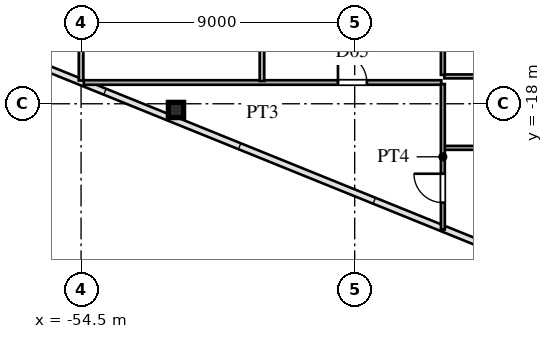
"""IFC4 building model, lengths in metres.
Left out: names, types, materials, properties, quantities, classifications, styles, units other than length and angle.
Written with IfcOpenShell. Run it as: python <this file> out.ifc"""

import sys

from ifc_helpers import new_model, si_unit, direction, frame, frame_2d, origin, origin_2d, place, context, subcontext, project, spatial, rectangle, hollow_rectangle, extrude, source, transform, mapped, element, fill, save


model = new_model("IFC4")
c1 = context("Model", 3, precision=1e-05, world=origin(), true_north=direction((0.0, 1.0)))
c2 = subcontext(c1, "Body", "Model", "MODEL_VIEW")
j1 = project(units=[si_unit("LENGTHUNIT", "METRE"), si_unit("PLANEANGLEUNIT", "RADIAN")], contexts=[c1])
p1 = place(None, origin())
s1 = spatial("IfcSite", under=j1, at=p1, CompositionType="ELEMENT")
p2 = place(p1, origin())
s2 = spatial("IfcBuilding", under=s1, at=p2, CompositionType="ELEMENT")
p3 = place(p2, frame((0.0, 0.0, 58.5)))
s3 = spatial("IfcBuildingStorey", under=s2, at=p3, CompositionType="ELEMENT", Elevation=58.5)
m1 = source(origin(), c2, "Body", "SweptSolid", [
    extrude(hollow_rectangle(XDim=0.5, YDim=0.5, WallThickness=0.02, at=origin_2d()), origin(), (0.0, 0.0, 1.0), 3.6),
])
p4 = place(p3, frame((-51.378, -18.204, 0.0), z_axis=(0.0, 0.0, 1.0), x_axis=(1.0, 0.0, 0.0)))
e1 = element("IfcColumn", 1, at=p4, inside=s3, PredefinedType="COLUMN", context=c2, shape_type="MappedRepresentation", body=[
    mapped(m1, transform((0.0, 0.0, 0.0), scale=1.0)),
])
p5 = place(p3, frame((-42.55, -19.45, 0.0), z_axis=(0.0, 0.0, 1.0), x_axis=(1.0, 0.0, 0.0)))
e2 = element("IfcWall", 2, at=p5, inside=s3, PredefinedType="PARTITIONING", context=c2, shape_type="SweptSolid", body=[
    extrude(rectangle(XDim=6.0, YDim=0.13, at=frame_2d((3.0, 0.0))), origin(), (0.0, 0.0, 1.0), 3.38),
])
p6 = place(p3, frame((-54.412, -17.3, 0.0), z_axis=(0.0, 0.0, 1.0), x_axis=(1.0, 0.0, 0.0)))
e3 = element("IfcWall", 3, at=p6, inside=s3, PredefinedType="PARTITIONING", context=c2, shape_type="SweptSolid", body=[
    extrude(rectangle(XDim=11.762, YDim=0.15, at=frame_2d((5.881, 0.0))), origin(), (0.0, 0.0, 1.0), 3.38),
])
p7 = place(p6, frame((8.362, 0.0, 0.0)))
e4 = element("IfcOpeningElement", 4, at=p7, cuts=e3, PredefinedType="OPENING", context=c2, shape_type="SweptSolid", body=[
    extrude(rectangle(XDim=0.95, YDim=2.15, at=frame_2d((0.475, 1.075))), frame((0.0, 0.085, 0.0), z_axis=(0.0, -1.0, 0.0), x_axis=(1.0, 0.0, 0.0)), (0.0, 0.0, 1.0), 0.17),
])
p8 = place(p3, frame((-42.55, -17.1, 0.0), z_axis=(0.0, 0.0, 1.0), x_axis=(1.0, 0.0, 0.0)))
e5 = element("IfcWall", 5, at=p8, inside=s3, PredefinedType="PARTITIONING", context=c2, shape_type="SweptSolid", body=[
    extrude(rectangle(XDim=5.25, YDim=0.13, at=frame_2d((2.625, 0.0))), origin(), (0.0, 0.0, 1.0), 3.38),
])
p9 = place(p8, frame((2.185, 0.0, 0.0)))
e6 = element("IfcOpeningElement", 6, at=p9, cuts=e5, PredefinedType="OPENING", context=c2, shape_type="SweptSolid", body=[
    extrude(rectangle(XDim=0.88, YDim=2.1, at=frame_2d((0.44, 1.05))), frame((0.0, 0.075, 0.0), z_axis=(0.0, -1.0, 0.0), x_axis=(1.0, 0.0, 0.0)), (0.0, 0.0, 1.0), 0.15),
])
p10 = place(p3, frame((-54.5, -17.236, 0.0), z_axis=(0.0, 0.0, 1.0), x_axis=(0.0, 1.0, 0.0)))
e7 = element("IfcWall", 7, at=p10, inside=s3, PredefinedType="PARTITIONING", context=c2, shape_type="SweptSolid", body=[
    extrude(rectangle(XDim=29.686, YDim=0.15, at=frame_2d((14.843, 0.0))), origin(), (0.0, 0.0, 1.0), 2.68),
])
p11 = place(p10, frame((1.868, 0.0, 0.0)))
e8 = element("IfcOpeningElement", 8, at=p11, cuts=e7, PredefinedType="OPENING", context=c2, shape_type="SweptSolid", body=[
    extrude(rectangle(XDim=0.95, YDim=2.15, at=frame_2d((0.475, 1.075))), frame((0.0, 0.085, 0.0), z_axis=(0.0, -1.0, 0.0), x_axis=(1.0, 0.0, 0.0)), (0.0, 0.0, 1.0), 0.17),
])
p12 = place(p10, frame((11.188, 0.0, 0.0)))
e9 = element("IfcOpeningElement", 9, at=p12, cuts=e7, PredefinedType="OPENING", context=c2, shape_type="SweptSolid", body=[
    extrude(rectangle(XDim=0.95, YDim=2.15, at=frame_2d((0.475, 1.075))), frame((0.0, 0.085, 0.0), z_axis=(0.0, -1.0, 0.0), x_axis=(1.0, 0.0, 0.0)), (0.0, 0.0, 1.0), 0.17),
])
p13 = place(p10, frame((23.761, 0.0, 0.0)))
e10 = element("IfcOpeningElement", 10, at=p13, cuts=e7, PredefinedType="OPENING", context=c2, shape_type="SweptSolid", body=[
    extrude(rectangle(XDim=0.95, YDim=2.15, at=frame_2d((0.475, 1.075))), frame((0.0, 0.085, 0.0), z_axis=(0.0, -1.0, 0.0), x_axis=(1.0, 0.0, 0.0)), (0.0, 0.0, 1.0), 0.17),
])
p14 = place(p3, frame((-48.55, -17.251, 0.0), z_axis=(0.0, 0.0, 1.0), x_axis=(0.0, 1.0, 0.0)))
e11 = element("IfcWall", 11, at=p14, inside=s3, PredefinedType="PARTITIONING", context=c2, shape_type="SweptSolid", body=[
    extrude(rectangle(XDim=4.701, YDim=0.15, at=frame_2d((2.351, 0.0))), origin(), (0.0, 0.0, 1.0), 3.38),
])
p15 = place(p14, frame((2.696, 0.0, 0.0)))
e12 = element("IfcOpeningElement", 12, at=p15, cuts=e11, PredefinedType="OPENING", context=c2, shape_type="SweptSolid", body=[
    extrude(rectangle(XDim=0.95, YDim=2.15, at=frame_2d((0.475, 1.075))), frame((0.0, 0.085, 0.0), z_axis=(0.0, -1.0, 0.0), x_axis=(1.0, 0.0, 0.0)), (0.0, 0.0, 1.0), 0.17),
])
p16 = place(p3, frame((-42.6, -22.137, 0.0), z_axis=(0.0, 0.0, 1.0), x_axis=(0.0, 1.0, 0.0)))
e13 = element("IfcWall", 13, at=p16, inside=s3, PredefinedType="PARTITIONING", context=c2, shape_type="SweptSolid", body=[
    extrude(rectangle(XDim=4.786, YDim=0.13, at=frame_2d((2.393, 0.0))), origin(), (0.0, 0.0, 1.0), 3.38),
])
p17 = place(p16, frame((0.886, 0.0, 0.0)))
e14 = element("IfcOpeningElement", 14, at=p17, cuts=e13, PredefinedType="OPENING", context=c2, shape_type="SweptSolid", body=[
    extrude(rectangle(XDim=0.95, YDim=2.15, at=frame_2d((0.475, 1.075))), frame((0.0, 0.075, 0.0), z_axis=(0.0, -1.0, 0.0), x_axis=(1.0, 0.0, 0.0)), (0.0, 0.0, 1.0), 0.15),
])
p18 = place(p3, frame((-42.6, -17.05, 0.0), z_axis=(0.0, 0.0, 1.0), x_axis=(0.0, 1.0, 0.0)))
e15 = element("IfcWall", 15, at=p18, inside=s3, PredefinedType="PARTITIONING", context=c2, shape_type="SweptSolid", body=[
    extrude(rectangle(XDim=13.833, YDim=0.13, at=frame_2d((6.917, 0.0))), origin(), (0.0, 0.0, 1.0), 3.38),
])
p19 = place(p18, frame((1.775, 0.0, 0.0)))
e16 = element("IfcOpeningElement", 16, at=p19, cuts=e15, PredefinedType="OPENING", context=c2, shape_type="SweptSolid", body=[
    extrude(rectangle(XDim=0.95, YDim=2.15, at=frame_2d((0.475, 1.075))), frame((0.0, 0.075, 0.0), z_axis=(0.0, -1.0, 0.0), x_axis=(1.0, 0.0, 0.0)), (0.0, 0.0, 1.0), 0.15),
])
p20 = place(p18, frame((11.075, 0.0, 0.0)))
e17 = element("IfcOpeningElement", 17, at=p20, cuts=e15, PredefinedType="OPENING", context=c2, shape_type="SweptSolid", body=[
    extrude(rectangle(XDim=0.95, YDim=2.15, at=frame_2d((0.475, 1.075))), frame((0.0, 0.075, 0.0), z_axis=(0.0, -1.0, 0.0), x_axis=(1.0, 0.0, 0.0)), (0.0, 0.0, 1.0), 0.15),
])
m2 = source(origin(), c2, "Body", "SweptSolid", [
    extrude(rectangle(XDim=0.95, YDim=2.15, at=frame_2d((0.475, 1.075))), frame((0.0, 0.025, 0.0), z_axis=(0.0, -1.0, 0.0), x_axis=(1.0, 0.0, 0.0)), (0.0, 0.0, 1.0), 0.05),
])
p21 = place(p7, origin())
e18 = element("IfcDoor", 18, at=p21, inside=s3, OperationType="SINGLE_SWING_LEFT", PredefinedType="DOOR", context=c2, shape_type="MappedRepresentation", body=[
    mapped(m2, transform((0.0, 0.0, 0.0), scale=1.0)),
])
fill(e4, e18)
p22 = place(p17, origin())
e19 = element("IfcDoor", 19, at=p22, inside=s3, OperationType="SINGLE_SWING_RIGHT", PredefinedType="DOOR", context=c2, shape_type="MappedRepresentation", body=[
    mapped(m2, transform((0.0, 0.0, 0.0), scale=1.0)),
])
fill(e14, e19)
save(model, sys.argv[1])
